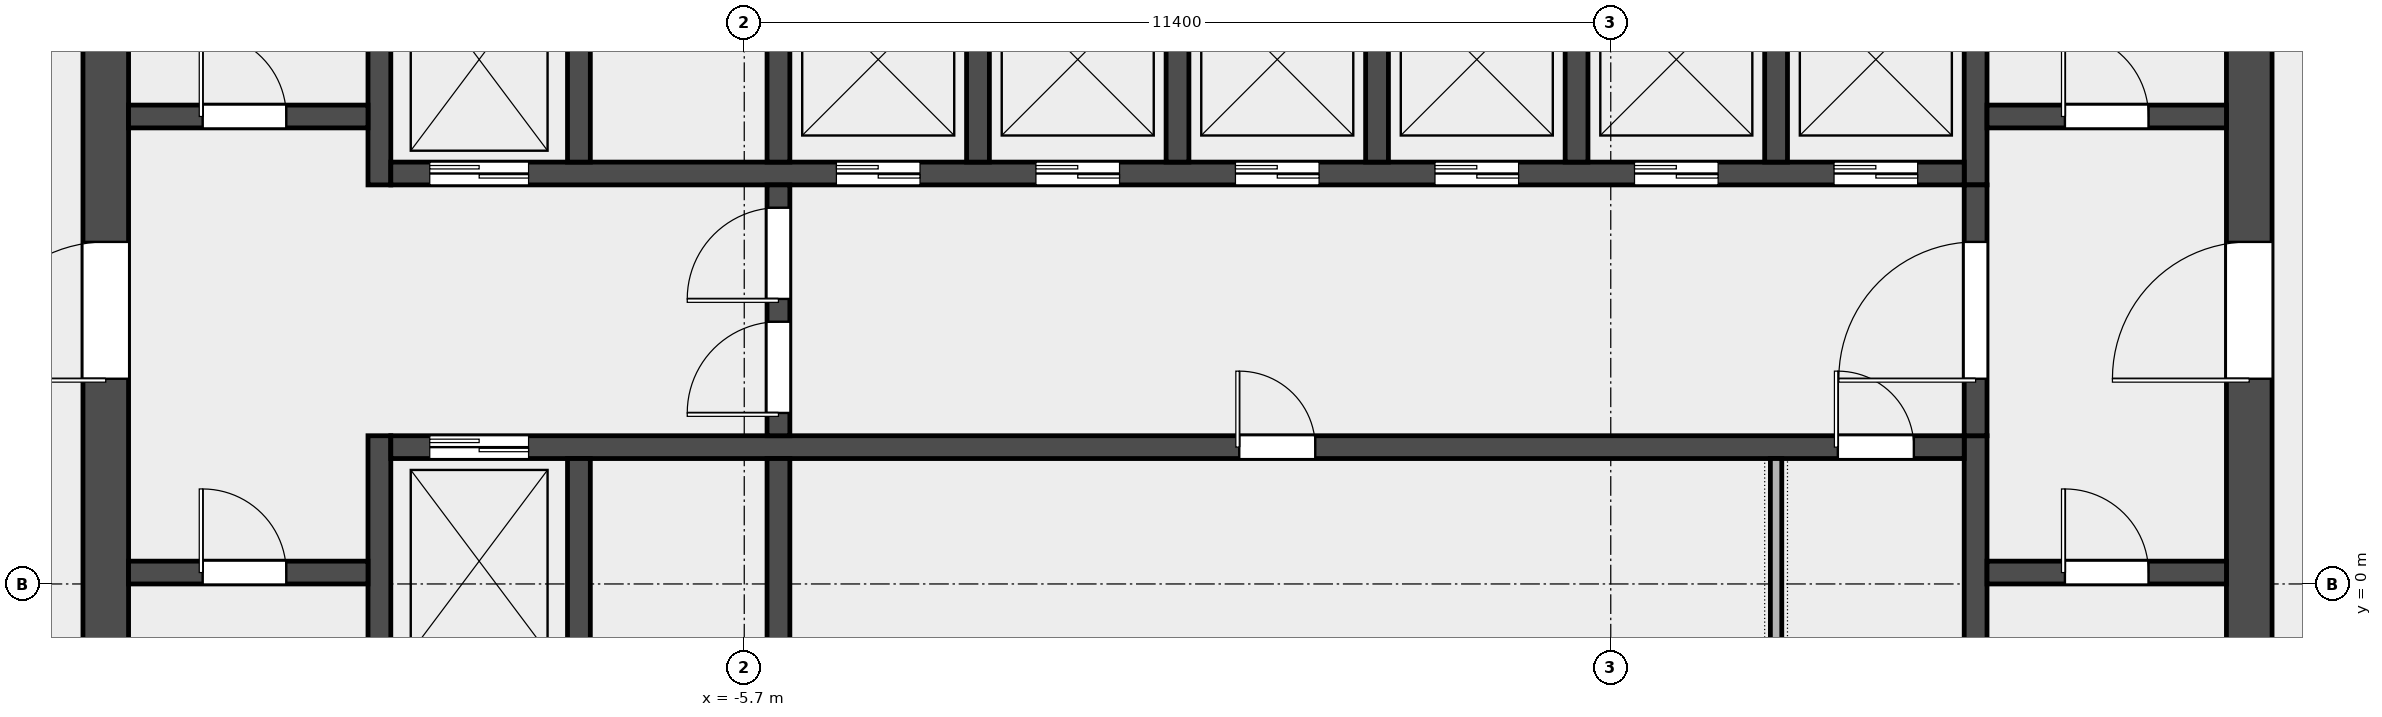
"""IFC4 building model, lengths in metres.
Left out: names, types, materials, properties, quantities, classifications, styles, units other than length and angle.
Written with IfcOpenShell. Run it as: python <this file> out.ifc"""

import sys

from ifc_helpers import new_model, si_unit, direction, frame, frame_2d, origin, place, context, subcontext, project, spatial, rectangle, extrude, element, fill, save


model = new_model("IFC4")
c1 = context("Model", 3, precision=1e-05, world=origin(), true_north=direction((0.0, 1.0)))
c2 = subcontext(c1, "Body", "Model", "MODEL_VIEW")
j1 = project(units=[si_unit("LENGTHUNIT", "METRE"), si_unit("PLANEANGLEUNIT", "RADIAN")], contexts=[c1])
p1 = place(None, origin())
s1 = spatial("IfcSite", under=j1, at=p1, CompositionType="ELEMENT")
p2 = place(p1, origin())
s2 = spatial("IfcBuilding", under=s1, at=p2, CompositionType="ELEMENT")
p3 = place(p2, frame((0.0, 0.0, 315.4)))
s3 = spatial("IfcBuildingStorey", under=s2, at=p3, CompositionType="ELEMENT", Elevation=315.4)
p4 = place(p3, frame((-14.1, -6.6, 0.0), z_axis=(0.0, 0.0, 1.0), x_axis=(0.0, 1.0, 0.0)))
e1 = element("IfcWall", 1, at=p4, inside=s3, PredefinedType="SHEAR", context=c2, shape_type="SweptSolid", body=[
    extrude(rectangle(XDim=19.5, YDim=0.6, at=frame_2d((9.75, 0.0))), origin(), (0.0, 0.0, 1.0), 5.7),
])
p5 = place(p4, frame((9.3, 0.0, 0.0)))
e2 = element("IfcOpeningElement", 2, at=p5, cuts=e1, PredefinedType="OPENING", context=c2, shape_type="SweptSolid", body=[
    extrude(rectangle(XDim=1.8, YDim=2.1, at=frame_2d((0.9, 1.05))), frame((0.0, 0.312, 0.0), z_axis=(0.0, -1.0, 0.0), x_axis=(1.0, 0.0, 0.0)), (0.0, 0.0, 1.0), 0.624),
])
p6 = place(p3, frame((14.1, -6.6, 0.0), z_axis=(0.0, 0.0, 1.0), x_axis=(0.0, 1.0, 0.0)))
e3 = element("IfcWall", 3, at=p6, inside=s3, PredefinedType="SHEAR", context=c2, shape_type="SweptSolid", body=[
    extrude(rectangle(XDim=19.5, YDim=0.6, at=frame_2d((9.75, 0.0))), origin(), (0.0, 0.0, 1.0), 5.7),
])
p7 = place(p6, frame((9.3, 0.0, 0.0)))
e4 = element("IfcOpeningElement", 4, at=p7, cuts=e3, PredefinedType="OPENING", context=c2, shape_type="SweptSolid", body=[
    extrude(rectangle(XDim=1.8, YDim=2.1, at=frame_2d((0.9, 1.05))), frame((0.0, 0.312, 0.0), z_axis=(0.0, -1.0, 0.0), x_axis=(1.0, 0.0, 0.0)), (0.0, 0.0, 1.0), 0.624),
])
p8 = place(p3, frame((-10.5, -6.6, 0.0), z_axis=(0.0, 0.0, 1.0), x_axis=(0.0, 1.0, 0.0)))
e5 = element("IfcWall", 5, at=p8, inside=s3, PredefinedType="SHEAR", context=c2, shape_type="SweptSolid", body=[
    extrude(rectangle(XDim=8.55, YDim=0.3, at=frame_2d((4.275, 0.0))), origin(), (0.0, 0.0, 1.0), 5.7),
])
p9 = place(p3, frame((-10.5, 5.25, 0.0), z_axis=(0.0, 0.0, 1.0), x_axis=(0.0, 1.0, 0.0)))
e6 = element("IfcWall", 6, at=p9, inside=s3, PredefinedType="SHEAR", context=c2, shape_type="SweptSolid", body=[
    extrude(rectangle(XDim=7.65, YDim=0.3, at=frame_2d((3.825, 0.0))), origin(), (0.0, 0.0, 1.0), 5.7),
])
p10 = place(p3, frame((10.5, -6.6, 0.0), z_axis=(0.0, 0.0, 1.0), x_axis=(0.0, 1.0, 0.0)))
e7 = element("IfcWall", 7, at=p10, inside=s3, PredefinedType="SHEAR", context=c2, shape_type="SweptSolid", body=[
    extrude(rectangle(XDim=8.55, YDim=0.3, at=frame_2d((4.275, 0.0))), origin(), (0.0, 0.0, 1.0), 5.7),
])
p11 = place(p3, frame((10.5, 5.25, 0.0), z_axis=(0.0, 0.0, 1.0), x_axis=(0.0, 1.0, 0.0)))
e8 = element("IfcWall", 8, at=p11, inside=s3, PredefinedType="SHEAR", context=c2, shape_type="SweptSolid", body=[
    extrude(rectangle(XDim=7.65, YDim=0.3, at=frame_2d((3.825, 0.0))), origin(), (0.0, 0.0, 1.0), 5.7),
])
p12 = place(p3, frame((-13.8, 0.15, 0.0), z_axis=(0.0, 0.0, 1.0), x_axis=(1.0, 0.0, 0.0)))
e9 = element("IfcWall", 9, at=p12, inside=s3, PredefinedType="SOLIDWALL", context=c2, shape_type="SweptSolid", body=[
    extrude(rectangle(XDim=3.15, YDim=0.3, at=frame_2d((1.575, 0.0))), origin(), (0.0, 0.0, 1.0), 5.7),
])
p13 = place(p12, frame((0.975, 0.0, 0.0)))
e10 = element("IfcOpeningElement", 10, at=p13, cuts=e9, PredefinedType="OPENING", context=c2, shape_type="SweptSolid", body=[
    extrude(rectangle(XDim=1.1, YDim=2.1, at=frame_2d((0.55, 1.05))), frame((0.0, 0.162, 0.0), z_axis=(0.0, -1.0, 0.0), x_axis=(1.0, 0.0, 0.0)), (0.0, 0.0, 1.0), 0.324),
])
p14 = place(p3, frame((-13.8, 6.15, 0.0), z_axis=(0.0, 0.0, 1.0), x_axis=(1.0, 0.0, 0.0)))
e11 = element("IfcWall", 11, at=p14, inside=s3, PredefinedType="SOLIDWALL", context=c2, shape_type="SweptSolid", body=[
    extrude(rectangle(XDim=3.15, YDim=0.3, at=frame_2d((1.575, 0.0))), origin(), (0.0, 0.0, 1.0), 5.7),
])
p15 = place(p14, frame((0.975, 0.0, 0.0)))
e12 = element("IfcOpeningElement", 12, at=p15, cuts=e11, PredefinedType="OPENING", context=c2, shape_type="SweptSolid", body=[
    extrude(rectangle(XDim=1.1, YDim=2.1, at=frame_2d((0.55, 1.05))), frame((0.0, 0.162, 0.0), z_axis=(0.0, -1.0, 0.0), x_axis=(1.0, 0.0, 0.0)), (0.0, 0.0, 1.0), 0.324),
])
p16 = place(p3, frame((10.65, 0.15, 0.0), z_axis=(0.0, 0.0, 1.0), x_axis=(1.0, 0.0, 0.0)))
e13 = element("IfcWall", 13, at=p16, inside=s3, PredefinedType="SOLIDWALL", context=c2, shape_type="SweptSolid", body=[
    extrude(rectangle(XDim=3.15, YDim=0.3, at=frame_2d((1.575, 0.0))), origin(), (0.0, 0.0, 1.0), 5.7),
])
p17 = place(p16, frame((1.025, 0.0, 0.0)))
e14 = element("IfcOpeningElement", 14, at=p17, cuts=e13, PredefinedType="OPENING", context=c2, shape_type="SweptSolid", body=[
    extrude(rectangle(XDim=1.1, YDim=2.1, at=frame_2d((0.55, 1.05))), frame((0.0, 0.162, 0.0), z_axis=(0.0, -1.0, 0.0), x_axis=(1.0, 0.0, 0.0)), (0.0, 0.0, 1.0), 0.324),
])
p18 = place(p3, frame((10.65, 6.15, 0.0), z_axis=(0.0, 0.0, 1.0), x_axis=(1.0, 0.0, 0.0)))
e15 = element("IfcWall", 15, at=p18, inside=s3, PredefinedType="SOLIDWALL", context=c2, shape_type="SweptSolid", body=[
    extrude(rectangle(XDim=3.15, YDim=0.3, at=frame_2d((1.575, 0.0))), origin(), (0.0, 0.0, 1.0), 5.7),
])
p19 = place(p18, frame((1.025, 0.0, 0.0)))
e16 = element("IfcOpeningElement", 16, at=p19, cuts=e15, PredefinedType="OPENING", context=c2, shape_type="SweptSolid", body=[
    extrude(rectangle(XDim=1.1, YDim=2.1, at=frame_2d((0.55, 1.05))), frame((0.0, 0.162, 0.0), z_axis=(0.0, -1.0, 0.0), x_axis=(1.0, 0.0, 0.0)), (0.0, 0.0, 1.0), 0.324),
])
p20 = place(p3, frame((-10.35, 1.8, 0.0), z_axis=(0.0, 0.0, 1.0), x_axis=(1.0, 0.0, 0.0)))
e17 = element("IfcWall", 17, at=p20, inside=s3, PredefinedType="SOLIDWALL", context=c2, shape_type="SweptSolid", body=[
    extrude(rectangle(XDim=20.7, YDim=0.3, at=frame_2d((10.35, 0.0))), origin(), (0.0, 0.0, 1.0), 5.7),
])
p21 = place(p20, frame((0.512, 0.0, 0.0)))
e18 = element("IfcOpeningElement", 18, at=p21, cuts=e17, PredefinedType="OPENING", context=c2, shape_type="SweptSolid", body=[
    extrude(rectangle(XDim=1.3, YDim=2.1, at=frame_2d((0.65, 1.05))), frame((0.0, 0.162, 0.0), z_axis=(0.0, -1.0, 0.0), x_axis=(1.0, 0.0, 0.0)), (0.0, 0.0, 1.0), 0.324),
])
p22 = place(p20, frame((11.163, 0.0, 0.0)))
e19 = element("IfcOpeningElement", 19, at=p22, cuts=e17, PredefinedType="OPENING", context=c2, shape_type="SweptSolid", body=[
    extrude(rectangle(XDim=1.0, YDim=2.1, at=frame_2d((0.5, 1.05))), frame((0.0, 0.162, 0.0), z_axis=(0.0, -1.0, 0.0), x_axis=(1.0, 0.0, 0.0)), (0.0, 0.0, 1.0), 0.324),
])
p23 = place(p20, frame((19.038, 0.0, 0.0)))
e20 = element("IfcOpeningElement", 20, at=p23, cuts=e17, PredefinedType="OPENING", context=c2, shape_type="SweptSolid", body=[
    extrude(rectangle(XDim=1.0, YDim=2.1, at=frame_2d((0.5, 1.05))), frame((0.0, 0.162, 0.0), z_axis=(0.0, -1.0, 0.0), x_axis=(1.0, 0.0, 0.0)), (0.0, 0.0, 1.0), 0.324),
])
p24 = place(p3, frame((-10.35, 5.4, 0.0), z_axis=(0.0, 0.0, 1.0), x_axis=(1.0, 0.0, 0.0)))
e21 = element("IfcWall", 21, at=p24, inside=s3, PredefinedType="SOLIDWALL", context=c2, shape_type="SweptSolid", body=[
    extrude(rectangle(XDim=20.7, YDim=0.3, at=frame_2d((10.35, 0.0))), origin(), (0.0, 0.0, 1.0), 5.7),
])
p25 = place(p24, frame((0.512, 0.0, 0.0)))
e22 = element("IfcOpeningElement", 22, at=p25, cuts=e21, PredefinedType="OPENING", context=c2, shape_type="SweptSolid", body=[
    extrude(rectangle(XDim=1.3, YDim=2.1, at=frame_2d((0.65, 1.05))), frame((0.0, 0.162, 0.0), z_axis=(0.0, -1.0, 0.0), x_axis=(1.0, 0.0, 0.0)), (0.0, 0.0, 1.0), 0.324),
])
p26 = place(p24, frame((5.863, 0.0, 0.0)))
e23 = element("IfcOpeningElement", 23, at=p26, cuts=e21, PredefinedType="OPENING", context=c2, shape_type="SweptSolid", body=[
    extrude(rectangle(XDim=1.1, YDim=2.1, at=frame_2d((0.55, 1.05))), frame((0.0, 0.162, 0.0), z_axis=(0.0, -1.0, 0.0), x_axis=(1.0, 0.0, 0.0)), (0.0, 0.0, 1.0), 0.324),
])
p27 = place(p24, frame((8.488, 0.0, 0.0)))
e24 = element("IfcOpeningElement", 24, at=p27, cuts=e21, PredefinedType="OPENING", context=c2, shape_type="SweptSolid", body=[
    extrude(rectangle(XDim=1.1, YDim=2.1, at=frame_2d((0.55, 1.05))), frame((0.0, 0.162, 0.0), z_axis=(0.0, -1.0, 0.0), x_axis=(1.0, 0.0, 0.0)), (0.0, 0.0, 1.0), 0.324),
])
p28 = place(p24, frame((11.113, 0.0, 0.0)))
e25 = element("IfcOpeningElement", 25, at=p28, cuts=e21, PredefinedType="OPENING", context=c2, shape_type="SweptSolid", body=[
    extrude(rectangle(XDim=1.1, YDim=2.1, at=frame_2d((0.55, 1.05))), frame((0.0, 0.162, 0.0), z_axis=(0.0, -1.0, 0.0), x_axis=(1.0, 0.0, 0.0)), (0.0, 0.0, 1.0), 0.324),
])
p29 = place(p24, frame((13.738, 0.0, 0.0)))
e26 = element("IfcOpeningElement", 26, at=p29, cuts=e21, PredefinedType="OPENING", context=c2, shape_type="SweptSolid", body=[
    extrude(rectangle(XDim=1.1, YDim=2.1, at=frame_2d((0.55, 1.05))), frame((0.0, 0.162, 0.0), z_axis=(0.0, -1.0, 0.0), x_axis=(1.0, 0.0, 0.0)), (0.0, 0.0, 1.0), 0.324),
])
p30 = place(p24, frame((16.363, 0.0, 0.0)))
e27 = element("IfcOpeningElement", 27, at=p30, cuts=e21, PredefinedType="OPENING", context=c2, shape_type="SweptSolid", body=[
    extrude(rectangle(XDim=1.1, YDim=2.1, at=frame_2d((0.55, 1.05))), frame((0.0, 0.162, 0.0), z_axis=(0.0, -1.0, 0.0), x_axis=(1.0, 0.0, 0.0)), (0.0, 0.0, 1.0), 0.324),
])
p31 = place(p24, frame((18.988, 0.0, 0.0)))
e28 = element("IfcOpeningElement", 28, at=p31, cuts=e21, PredefinedType="OPENING", context=c2, shape_type="SweptSolid", body=[
    extrude(rectangle(XDim=1.1, YDim=2.1, at=frame_2d((0.55, 1.05))), frame((0.0, 0.162, 0.0), z_axis=(0.0, -1.0, 0.0), x_axis=(1.0, 0.0, 0.0)), (0.0, 0.0, 1.0), 0.324),
])
for number, where, z_axis, x_axis in (
    (29, (-7.875, -1.05, 0.0), (0.0, 0.0, 1.0), (0.0, 1.0, 0.0)),
    (30, (-5.25, -1.05, 0.0), (0.0, 0.0, 1.0), (0.0, 1.0, 0.0)),
    (31, (-7.875, 5.55, 0.0), (0.0, 0.0, 1.0), (0.0, 1.0, 0.0)),
    (32, (-5.25, 5.55, 0.0), (0.0, 0.0, 1.0), (0.0, 1.0, 0.0)),
    (33, (-2.625, 5.55, 0.0), (0.0, 0.0, 1.0), (0.0, 1.0, 0.0)),
    (34, (0.0, 5.55, 0.0), (0.0, 0.0, 1.0), (0.0, 1.0, 0.0)),
    (35, (2.625, 5.55, 0.0), (0.0, 0.0, 1.0), (0.0, 1.0, 0.0)),
    (36, (5.25, 5.55, 0.0), (0.0, 0.0, 1.0), (0.0, 1.0, 0.0)),
    (37, (7.875, 5.55, 0.0), (0.0, 0.0, 1.0), (0.0, 1.0, 0.0)),
):
    element("IfcWall", number, at=place(p3, frame(where, z_axis=z_axis, x_axis=x_axis)), inside=s3, PredefinedType="SOLIDWALL", context=c2, shape_type="SweptSolid", body=[
        extrude(rectangle(XDim=2.7, YDim=0.3, at=frame_2d((1.35, 0.0))), origin(), (0.0, 0.0, 1.0), 5.7),
    ])
p32 = place(p3, frame((-5.25, 1.95, 0.0), z_axis=(0.0, 0.0, 1.0), x_axis=(0.0, 1.0, 0.0)))
e38 = element("IfcWall", 38, at=p32, inside=s3, PredefinedType="SOLIDWALL", context=c2, shape_type="SweptSolid", body=[
    extrude(rectangle(XDim=3.3, YDim=0.3, at=frame_2d((1.65, 0.0))), origin(), (0.0, 0.0, 1.0), 5.7),
])
p33 = place(p32, frame((0.3, 0.0, 0.0)))
e39 = element("IfcOpeningElement", 39, at=p33, cuts=e38, PredefinedType="OPENING", context=c2, shape_type="SweptSolid", body=[
    extrude(rectangle(XDim=1.2, YDim=2.1, at=frame_2d((0.6, 1.05))), frame((0.0, 0.162, 0.0), z_axis=(0.0, -1.0, 0.0), x_axis=(1.0, 0.0, 0.0)), (0.0, 0.0, 1.0), 0.324),
])
p34 = place(p32, frame((1.8, 0.0, 0.0)))
e40 = element("IfcOpeningElement", 40, at=p34, cuts=e38, PredefinedType="OPENING", context=c2, shape_type="SweptSolid", body=[
    extrude(rectangle(XDim=1.2, YDim=2.1, at=frame_2d((0.6, 1.05))), frame((0.0, 0.162, 0.0), z_axis=(0.0, -1.0, 0.0), x_axis=(1.0, 0.0, 0.0)), (0.0, 0.0, 1.0), 0.324),
])
p35 = place(p3, frame((7.875, -1.05, 0.0), z_axis=(0.0, 0.0, 1.0), x_axis=(0.0, 1.0, 0.0)))
e41 = element("IfcWall", 41, at=p35, inside=s3, PredefinedType="PARTITIONING", context=c2, shape_type="SweptSolid", body=[
    extrude(rectangle(XDim=2.7, YDim=0.15, at=frame_2d((1.35, 0.0))), origin(), (0.0, 0.0, 1.0), 5.7),
])
p36 = place(p3, frame((10.5, 1.95, 0.0), z_axis=(0.0, 0.0, 1.0), x_axis=(0.0, 1.0, 0.0)))
e42 = element("IfcWall", 42, at=p36, inside=s3, PredefinedType="SOLIDWALL", context=c2, shape_type="SweptSolid", body=[
    extrude(rectangle(XDim=3.3, YDim=0.3, at=frame_2d((1.65, 0.0))), origin(), (0.0, 0.0, 1.0), 5.7),
])
p37 = place(p36, frame((0.75, 0.0, 0.0)))
e43 = element("IfcOpeningElement", 43, at=p37, cuts=e42, PredefinedType="OPENING", context=c2, shape_type="SweptSolid", body=[
    extrude(rectangle(XDim=1.8, YDim=2.1, at=frame_2d((0.9, 1.05))), frame((0.0, 0.162, 0.0), z_axis=(0.0, -1.0, 0.0), x_axis=(1.0, 0.0, 0.0)), (0.0, 0.0, 1.0), 0.324),
])
p38 = place(p13, origin())
e44 = element("IfcDoor", 44, at=p38, inside=s3, OperationType="SINGLE_SWING_LEFT", PredefinedType="DOOR", context=c2, shape_type="SweptSolid", body=[
    extrude(rectangle(XDim=1.1, YDim=2.1, at=frame_2d((0.55, 1.05))), frame((0.0, 0.025, 0.0), z_axis=(0.0, -1.0, 0.0), x_axis=(1.0, 0.0, 0.0)), (0.0, 0.0, 1.0), 0.05),
])
fill(e10, e44)
p39 = place(p15, origin())
e45 = element("IfcDoor", 45, at=p39, inside=s3, OperationType="SINGLE_SWING_LEFT", PredefinedType="DOOR", context=c2, shape_type="SweptSolid", body=[
    extrude(rectangle(XDim=1.1, YDim=2.1, at=frame_2d((0.55, 1.05))), frame((0.0, 0.025, 0.0), z_axis=(0.0, -1.0, 0.0), x_axis=(1.0, 0.0, 0.0)), (0.0, 0.0, 1.0), 0.05),
])
fill(e12, e45)
p40 = place(p17, origin())
e46 = element("IfcDoor", 46, at=p40, inside=s3, OperationType="SINGLE_SWING_RIGHT", PredefinedType="DOOR", context=c2, shape_type="SweptSolid", body=[
    extrude(rectangle(XDim=1.1, YDim=2.1, at=frame_2d((0.55, 1.05))), frame((0.0, 0.025, 0.0), z_axis=(0.0, -1.0, 0.0), x_axis=(1.0, 0.0, 0.0)), (0.0, 0.0, 1.0), 0.05),
])
fill(e14, e46)
p41 = place(p19, origin())
e47 = element("IfcDoor", 47, at=p41, inside=s3, OperationType="SINGLE_SWING_RIGHT", PredefinedType="DOOR", context=c2, shape_type="SweptSolid", body=[
    extrude(rectangle(XDim=1.1, YDim=2.1, at=frame_2d((0.55, 1.05))), frame((0.0, 0.025, 0.0), z_axis=(0.0, -1.0, 0.0), x_axis=(1.0, 0.0, 0.0)), (0.0, 0.0, 1.0), 0.05),
])
fill(e16, e47)
p42 = place(p5, origin())
e48 = element("IfcDoor", 48, at=p42, inside=s3, OperationType="DOUBLE_DOOR_SINGLE_SWING", PredefinedType="DOOR", context=c2, shape_type="SweptSolid", body=[
    extrude(rectangle(XDim=1.8, YDim=2.1, at=frame_2d((0.9, 1.05))), frame((0.0, 0.025, 0.0), z_axis=(0.0, -1.0, 0.0), x_axis=(1.0, 0.0, 0.0)), (0.0, 0.0, 1.0), 0.05),
])
fill(e2, e48)
p43 = place(p7, origin())
e49 = element("IfcDoor", 49, at=p43, inside=s3, OperationType="DOUBLE_DOOR_SINGLE_SWING", PredefinedType="DOOR", context=c2, shape_type="SweptSolid", body=[
    extrude(rectangle(XDim=1.8, YDim=2.1, at=frame_2d((0.9, 1.05))), frame((0.0, 0.025, 0.0), z_axis=(0.0, -1.0, 0.0), x_axis=(1.0, 0.0, 0.0)), (0.0, 0.0, 1.0), 0.05),
])
fill(e4, e49)
p44 = place(p33, origin())
e50 = element("IfcDoor", 50, at=p44, inside=s3, OperationType="SINGLE_SWING_LEFT", PredefinedType="DOOR", context=c2, shape_type="SweptSolid", body=[
    extrude(rectangle(XDim=1.2, YDim=2.1, at=frame_2d((0.6, 1.05))), frame((0.0, 0.025, 0.0), z_axis=(0.0, -1.0, 0.0), x_axis=(1.0, 0.0, 0.0)), (0.0, 0.0, 1.0), 0.05),
])
fill(e39, e50)
p45 = place(p34, origin())
e51 = element("IfcDoor", 51, at=p45, inside=s3, OperationType="SINGLE_SWING_RIGHT", PredefinedType="DOOR", context=c2, shape_type="SweptSolid", body=[
    extrude(rectangle(XDim=1.2, YDim=2.1, at=frame_2d((0.6, 1.05))), frame((0.0, 0.025, 0.0), z_axis=(0.0, -1.0, 0.0), x_axis=(1.0, 0.0, 0.0)), (0.0, 0.0, 1.0), 0.05),
])
fill(e40, e51)
p46 = place(p37, origin())
e52 = element("IfcDoor", 52, at=p46, inside=s3, OperationType="DOUBLE_DOOR_SINGLE_SWING", PredefinedType="DOOR", context=c2, shape_type="SweptSolid", body=[
    extrude(rectangle(XDim=1.8, YDim=2.1, at=frame_2d((0.9, 1.05))), frame((0.0, 0.025, 0.0), z_axis=(0.0, -1.0, 0.0), x_axis=(1.0, 0.0, 0.0)), (0.0, 0.0, 1.0), 0.05),
])
fill(e43, e52)
p47 = place(p21, origin())
e53 = element("IfcDoor", 53, at=p47, inside=s3, OperationType="DOUBLE_DOOR_SLIDING", PredefinedType="DOOR", context=c2, shape_type="SweptSolid", body=[
    extrude(rectangle(XDim=1.3, YDim=2.1, at=frame_2d((0.65, 1.05))), frame((0.0, 0.025, 0.0), z_axis=(0.0, -1.0, 0.0), x_axis=(1.0, 0.0, 0.0)), (0.0, 0.0, 1.0), 0.05),
])
fill(e18, e53)
p48 = place(p25, origin())
e54 = element("IfcDoor", 54, at=p48, inside=s3, OperationType="DOUBLE_DOOR_SLIDING", PredefinedType="DOOR", context=c2, shape_type="SweptSolid", body=[
    extrude(rectangle(XDim=1.3, YDim=2.1, at=frame_2d((0.65, 1.05))), frame((0.0, 0.025, 0.0), z_axis=(0.0, -1.0, 0.0), x_axis=(1.0, 0.0, 0.0)), (0.0, 0.0, 1.0), 0.05),
])
fill(e22, e54)
p49 = place(p26, origin())
e55 = element("IfcDoor", 55, at=p49, inside=s3, OperationType="DOUBLE_DOOR_SLIDING", PredefinedType="DOOR", context=c2, shape_type="SweptSolid", body=[
    extrude(rectangle(XDim=1.1, YDim=2.1, at=frame_2d((0.55, 1.05))), frame((0.0, 0.025, 0.0), z_axis=(0.0, -1.0, 0.0), x_axis=(1.0, 0.0, 0.0)), (0.0, 0.0, 1.0), 0.05),
])
fill(e23, e55)
p50 = place(p27, origin())
e56 = element("IfcDoor", 56, at=p50, inside=s3, OperationType="DOUBLE_DOOR_SLIDING", PredefinedType="DOOR", context=c2, shape_type="SweptSolid", body=[
    extrude(rectangle(XDim=1.1, YDim=2.1, at=frame_2d((0.55, 1.05))), frame((0.0, 0.025, 0.0), z_axis=(0.0, -1.0, 0.0), x_axis=(1.0, 0.0, 0.0)), (0.0, 0.0, 1.0), 0.05),
])
fill(e24, e56)
p51 = place(p28, origin())
e57 = element("IfcDoor", 57, at=p51, inside=s3, OperationType="DOUBLE_DOOR_SLIDING", PredefinedType="DOOR", context=c2, shape_type="SweptSolid", body=[
    extrude(rectangle(XDim=1.1, YDim=2.1, at=frame_2d((0.55, 1.05))), frame((0.0, 0.025, 0.0), z_axis=(0.0, -1.0, 0.0), x_axis=(1.0, 0.0, 0.0)), (0.0, 0.0, 1.0), 0.05),
])
fill(e25, e57)
p52 = place(p29, origin())
e58 = element("IfcDoor", 58, at=p52, inside=s3, OperationType="DOUBLE_DOOR_SLIDING", PredefinedType="DOOR", context=c2, shape_type="SweptSolid", body=[
    extrude(rectangle(XDim=1.1, YDim=2.1, at=frame_2d((0.55, 1.05))), frame((0.0, 0.025, 0.0), z_axis=(0.0, -1.0, 0.0), x_axis=(1.0, 0.0, 0.0)), (0.0, 0.0, 1.0), 0.05),
])
fill(e26, e58)
p53 = place(p30, origin())
e59 = element("IfcDoor", 59, at=p53, inside=s3, OperationType="DOUBLE_DOOR_SLIDING", PredefinedType="DOOR", context=c2, shape_type="SweptSolid", body=[
    extrude(rectangle(XDim=1.1, YDim=2.1, at=frame_2d((0.55, 1.05))), frame((0.0, 0.025, 0.0), z_axis=(0.0, -1.0, 0.0), x_axis=(1.0, 0.0, 0.0)), (0.0, 0.0, 1.0), 0.05),
])
fill(e27, e59)
p54 = place(p31, origin())
e60 = element("IfcDoor", 60, at=p54, inside=s3, OperationType="DOUBLE_DOOR_SLIDING", PredefinedType="DOOR", context=c2, shape_type="SweptSolid", body=[
    extrude(rectangle(XDim=1.1, YDim=2.1, at=frame_2d((0.55, 1.05))), frame((0.0, 0.025, 0.0), z_axis=(0.0, -1.0, 0.0), x_axis=(1.0, 0.0, 0.0)), (0.0, 0.0, 1.0), 0.05),
])
fill(e28, e60)
p55 = place(p22, origin())
e61 = element("IfcDoor", 61, at=p55, inside=s3, OperationType="SINGLE_SWING_LEFT", PredefinedType="DOOR", context=c2, shape_type="SweptSolid", body=[
    extrude(rectangle(XDim=1.0, YDim=2.1, at=frame_2d((0.5, 1.05))), frame((0.0, 0.025, 0.0), z_axis=(0.0, -1.0, 0.0), x_axis=(1.0, 0.0, 0.0)), (0.0, 0.0, 1.0), 0.05),
])
fill(e19, e61)
p56 = place(p23, origin())
e62 = element("IfcDoor", 62, at=p56, inside=s3, OperationType="SINGLE_SWING_LEFT", PredefinedType="DOOR", context=c2, shape_type="SweptSolid", body=[
    extrude(rectangle(XDim=1.0, YDim=2.1, at=frame_2d((0.5, 1.05))), frame((0.0, 0.025, 0.0), z_axis=(0.0, -1.0, 0.0), x_axis=(1.0, 0.0, 0.0)), (0.0, 0.0, 1.0), 0.05),
])
fill(e20, e62)
save(model, sys.argv[1])
